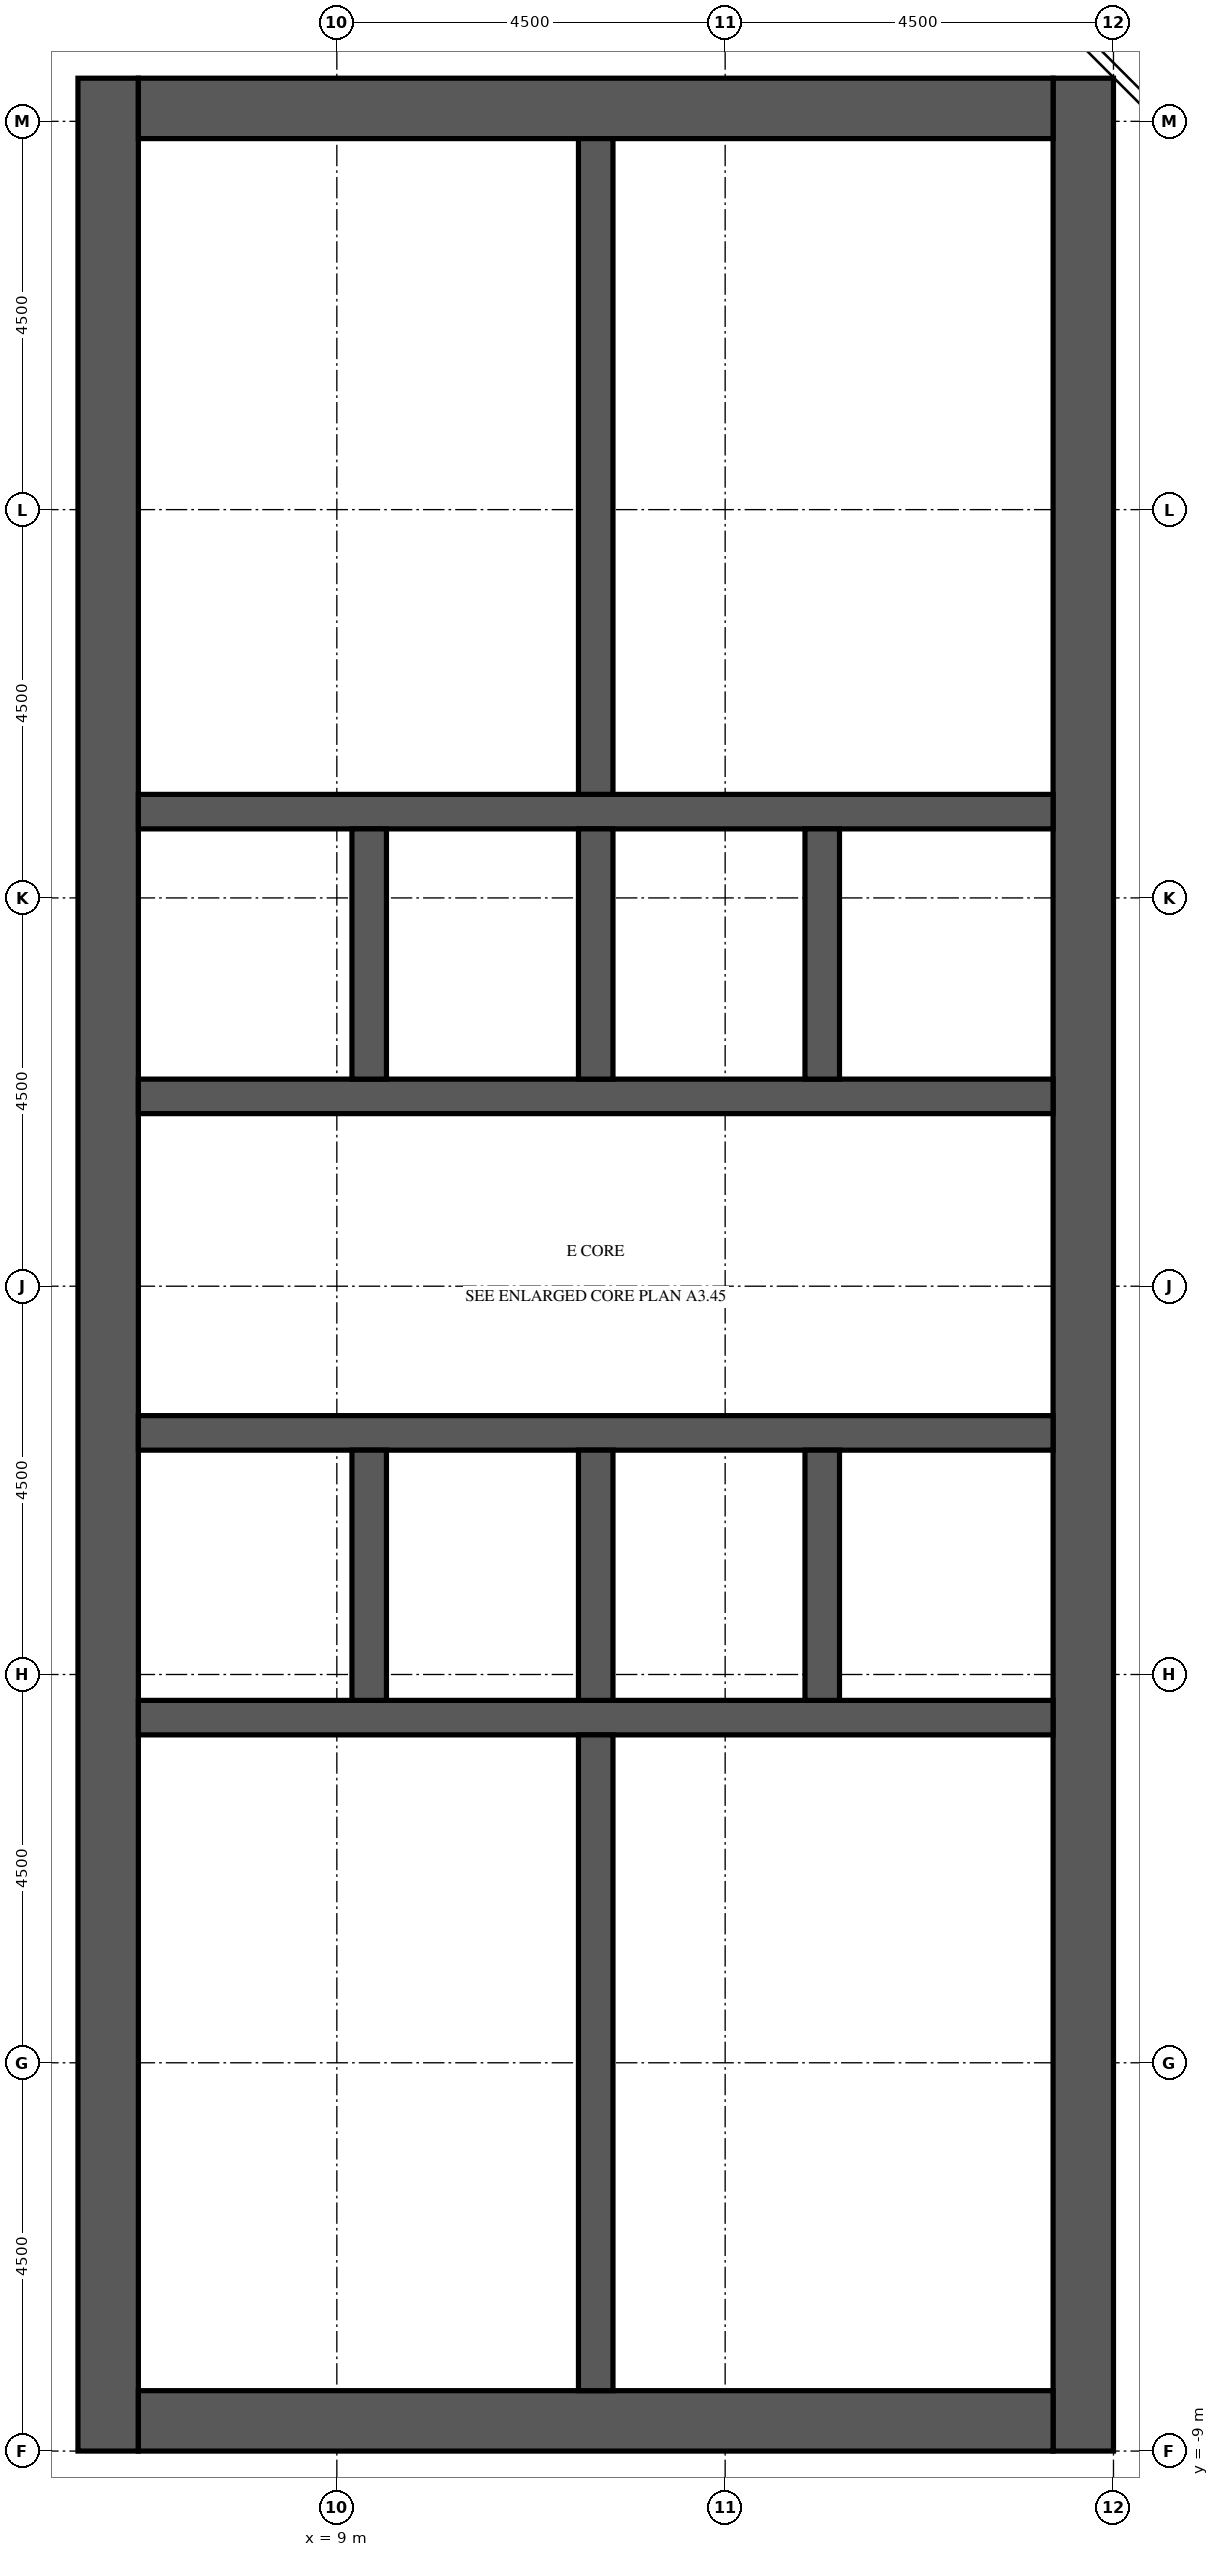
"""IFC4 building model, lengths in metres.
Left out: names, types, materials, properties, quantities, classifications, styles, units other than length and angle.
Written with IfcOpenShell. Run it as: python <this file> out.ifc"""

import sys

from ifc_helpers import new_model, si_unit, direction, frame, frame_2d, origin, place, context, subcontext, project, spatial, rectangle, extrude, element, fill, save


model = new_model("IFC4")
c1 = context("Model", 3, precision=1e-05, world=origin(), true_north=direction((0.0, 1.0)))
c2 = subcontext(c1, "Body", "Model", "MODEL_VIEW")
j1 = project(units=[si_unit("LENGTHUNIT", "METRE"), si_unit("PLANEANGLEUNIT", "RADIAN")], contexts=[c1])
p1 = place(None, origin())
s1 = spatial("IfcSite", under=j1, at=p1, CompositionType="ELEMENT")
p2 = place(p1, origin())
s2 = spatial("IfcBuilding", under=s1, at=p2, CompositionType="ELEMENT")
p3 = place(p2, frame((0.0, 0.0, 316.6)))
s3 = spatial("IfcBuildingStorey", under=s2, at=p3, CompositionType="ELEMENT", Elevation=316.6)
p4 = place(p3, frame((6.35, -9.0, 0.0), z_axis=(0.0, 0.0, 1.0), x_axis=(0.0, 1.0, 0.0)))
e1 = element("IfcWall", 1, at=p4, inside=s3, PredefinedType="SHEAR", context=c2, shape_type="SweptSolid", body=[
    extrude(rectangle(XDim=27.5, YDim=0.7, at=frame_2d((13.75, 0.0))), origin(), (0.0, 0.0, 1.0), 4.8),
])
p5 = place(p4, frame((12.55, 0.0, 0.0)))
e2 = element("IfcOpeningElement", 2, at=p5, cuts=e1, PredefinedType="OPENING", context=c2, shape_type="SweptSolid", body=[
    extrude(rectangle(XDim=2.4, YDim=2.4, at=frame_2d((1.2, 1.2))), frame((0.0, 0.36, 0.0), z_axis=(0.0, -1.0, 0.0), x_axis=(1.0, 0.0, 0.0)), (0.0, 0.0, 1.0), 0.72),
])
p6 = place(p4, frame((3.9, 0.0, 0.0)))
e3 = element("IfcOpeningElement", 3, at=p6, cuts=e1, PredefinedType="OPENING", context=c2, shape_type="SweptSolid", body=[
    extrude(rectangle(XDim=1.2, YDim=2.1, at=frame_2d((0.6, 1.05))), frame((0.0, 0.36, 0.0), z_axis=(0.0, -1.0, 0.0), x_axis=(1.0, 0.0, 0.0)), (0.0, 0.0, 1.0), 0.72),
])
p7 = place(p4, frame((22.4, 0.0, 0.0)))
e4 = element("IfcOpeningElement", 4, at=p7, cuts=e1, PredefinedType="OPENING", context=c2, shape_type="SweptSolid", body=[
    extrude(rectangle(XDim=1.2, YDim=2.1, at=frame_2d((0.6, 1.05))), frame((0.0, 0.36, 0.0), z_axis=(0.0, -1.0, 0.0), x_axis=(1.0, 0.0, 0.0)), (0.0, 0.0, 1.0), 0.72),
])
p8 = place(p3, frame((17.65, -9.0, 0.0), z_axis=(0.0, 0.0, 1.0), x_axis=(0.0, 1.0, 0.0)))
e5 = element("IfcWall", 5, at=p8, inside=s3, PredefinedType="SHEAR", context=c2, shape_type="SweptSolid", body=[
    extrude(rectangle(XDim=27.5, YDim=0.7, at=frame_2d((13.75, 0.0))), origin(), (0.0, 0.0, 1.0), 4.8),
])
for number, where, z_axis, x_axis in (
    (6, (6.7, -8.65, 0.0), (0.0, 0.0, 1.0), (1.0, 0.0, 0.0)),
    (7, (6.7, 18.15, 0.0), (0.0, 0.0, 1.0), (1.0, 0.0, 0.0)),
):
    element("IfcWall", number, at=place(p3, frame(where, z_axis=z_axis, x_axis=x_axis)), inside=s3, PredefinedType="SHEAR", context=c2, shape_type="SweptSolid", body=[
        extrude(rectangle(XDim=10.6, YDim=0.7, at=frame_2d((5.3, 0.0))), origin(), (0.0, 0.0, 1.0), 4.8),
    ])
p9 = place(p3, frame((6.7, -0.5, 0.0), z_axis=(0.0, 0.0, 1.0), x_axis=(1.0, 0.0, 0.0)))
e8 = element("IfcWall", 8, at=p9, inside=s3, PredefinedType="SHEAR", context=c2, shape_type="SweptSolid", body=[
    extrude(rectangle(XDim=10.6, YDim=0.4, at=frame_2d((5.3, 0.0))), origin(), (0.0, 0.0, 1.0), 4.8),
])
p10 = place(p3, frame((6.7, 2.8, 0.0), z_axis=(0.0, 0.0, 1.0), x_axis=(1.0, 0.0, 0.0)))
e9 = element("IfcWall", 9, at=p10, inside=s3, PredefinedType="SHEAR", context=c2, shape_type="SweptSolid", body=[
    extrude(rectangle(XDim=10.6, YDim=0.4, at=frame_2d((5.3, 0.0))), origin(), (0.0, 0.0, 1.0), 4.8),
])
p11 = place(p10, frame((0.688, 0.0, 0.0)))
e10 = element("IfcOpeningElement", 10, at=p11, cuts=e9, PredefinedType="OPENING", context=c2, shape_type="SweptSolid", body=[
    extrude(rectangle(XDim=1.1, YDim=2.1, at=frame_2d((0.55, 1.05))), frame((0.0, 0.21, 0.0), z_axis=(0.0, -1.0, 0.0), x_axis=(1.0, 0.0, 0.0)), (0.0, 0.0, 1.0), 0.42),
])
p12 = place(p10, frame((3.438, 0.0, 0.0)))
e11 = element("IfcOpeningElement", 11, at=p12, cuts=e9, PredefinedType="OPENING", context=c2, shape_type="SweptSolid", body=[
    extrude(rectangle(XDim=1.1, YDim=2.1, at=frame_2d((0.55, 1.05))), frame((0.0, 0.21, 0.0), z_axis=(0.0, -1.0, 0.0), x_axis=(1.0, 0.0, 0.0)), (0.0, 0.0, 1.0), 0.42),
])
p13 = place(p10, frame((6.113, 0.0, 0.0)))
e12 = element("IfcOpeningElement", 12, at=p13, cuts=e9, PredefinedType="OPENING", context=c2, shape_type="SweptSolid", body=[
    extrude(rectangle(XDim=1.0, YDim=2.1, at=frame_2d((0.5, 1.05))), frame((0.0, 0.21, 0.0), z_axis=(0.0, -1.0, 0.0), x_axis=(1.0, 0.0, 0.0)), (0.0, 0.0, 1.0), 0.42),
])
p14 = place(p10, frame((8.863, 0.0, 0.0)))
e13 = element("IfcOpeningElement", 13, at=p14, cuts=e9, PredefinedType="OPENING", context=c2, shape_type="SweptSolid", body=[
    extrude(rectangle(XDim=1.0, YDim=2.1, at=frame_2d((0.5, 1.05))), frame((0.0, 0.21, 0.0), z_axis=(0.0, -1.0, 0.0), x_axis=(1.0, 0.0, 0.0)), (0.0, 0.0, 1.0), 0.42),
])
p15 = place(p3, frame((6.7, 6.7, 0.0), z_axis=(0.0, 0.0, 1.0), x_axis=(1.0, 0.0, 0.0)))
e14 = element("IfcWall", 14, at=p15, inside=s3, PredefinedType="SHEAR", context=c2, shape_type="SweptSolid", body=[
    extrude(rectangle(XDim=10.6, YDim=0.4, at=frame_2d((5.3, 0.0))), origin(), (0.0, 0.0, 1.0), 4.8),
])
p16 = place(p15, frame((0.738, 0.0, 0.0)))
e15 = element("IfcOpeningElement", 15, at=p16, cuts=e14, PredefinedType="OPENING", context=c2, shape_type="SweptSolid", body=[
    extrude(rectangle(XDim=1.0, YDim=2.1, at=frame_2d((0.5, 1.05))), frame((0.0, 0.21, 0.0), z_axis=(0.0, -1.0, 0.0), x_axis=(1.0, 0.0, 0.0)), (0.0, 0.0, 1.0), 0.42),
])
p17 = place(p15, frame((3.488, 0.0, 0.0)))
e16 = element("IfcOpeningElement", 16, at=p17, cuts=e14, PredefinedType="OPENING", context=c2, shape_type="SweptSolid", body=[
    extrude(rectangle(XDim=1.0, YDim=2.1, at=frame_2d((0.5, 1.05))), frame((0.0, 0.21, 0.0), z_axis=(0.0, -1.0, 0.0), x_axis=(1.0, 0.0, 0.0)), (0.0, 0.0, 1.0), 0.42),
])
p18 = place(p15, frame((6.113, 0.0, 0.0)))
e17 = element("IfcOpeningElement", 17, at=p18, cuts=e14, PredefinedType="OPENING", context=c2, shape_type="SweptSolid", body=[
    extrude(rectangle(XDim=1.0, YDim=2.1, at=frame_2d((0.5, 1.05))), frame((0.0, 0.21, 0.0), z_axis=(0.0, -1.0, 0.0), x_axis=(1.0, 0.0, 0.0)), (0.0, 0.0, 1.0), 0.42),
])
p19 = place(p15, frame((8.863, 0.0, 0.0)))
e18 = element("IfcOpeningElement", 18, at=p19, cuts=e14, PredefinedType="OPENING", context=c2, shape_type="SweptSolid", body=[
    extrude(rectangle(XDim=1.0, YDim=2.1, at=frame_2d((0.5, 1.05))), frame((0.0, 0.21, 0.0), z_axis=(0.0, -1.0, 0.0), x_axis=(1.0, 0.0, 0.0)), (0.0, 0.0, 1.0), 0.42),
])
p20 = place(p3, frame((6.7, 10.0, 0.0), z_axis=(0.0, 0.0, 1.0), x_axis=(1.0, 0.0, 0.0)))
e19 = element("IfcWall", 19, at=p20, inside=s3, PredefinedType="SHEAR", context=c2, shape_type="SweptSolid", body=[
    extrude(rectangle(XDim=10.6, YDim=0.4, at=frame_2d((5.3, 0.0))), origin(), (0.0, 0.0, 1.0), 4.8),
])
for number, where, z_axis, x_axis in (
    (20, (9.375, -0.3, 0.0), (0.0, 0.0, 1.0), (0.0, 1.0, 0.0)),
    (21, (9.375, 6.9, 0.0), (0.0, 0.0, 1.0), (0.0, 1.0, 0.0)),
    (22, (12.0, -0.3, 0.0), (0.0, 0.0, 1.0), (0.0, 1.0, 0.0)),
    (23, (12.0, 6.9, 0.0), (0.0, 0.0, 1.0), (0.0, 1.0, 0.0)),
    (24, (14.625, -0.3, 0.0), (0.0, 0.0, 1.0), (0.0, 1.0, 0.0)),
    (25, (14.625, 6.9, 0.0), (0.0, 0.0, 1.0), (0.0, 1.0, 0.0)),
):
    element("IfcWall", number, at=place(p3, frame(where, z_axis=z_axis, x_axis=x_axis)), inside=s3, PredefinedType="SHEAR", context=c2, shape_type="SweptSolid", body=[
        extrude(rectangle(XDim=2.9, YDim=0.4, at=frame_2d((1.45, 0.0))), origin(), (0.0, 0.0, 1.0), 4.8),
    ])
p21 = place(p3, frame((12.0, -8.3, 0.0), z_axis=(0.0, 0.0, 1.0), x_axis=(0.0, 1.0, 0.0)))
e26 = element("IfcWall", 26, at=p21, inside=s3, PredefinedType="SHEAR", context=c2, shape_type="SweptSolid", body=[
    extrude(rectangle(XDim=7.6, YDim=0.4, at=frame_2d((3.8, 0.0))), origin(), (0.0, 0.0, 1.0), 4.8),
])
p22 = place(p21, frame((6.125, 0.0, 0.0)))
e27 = element("IfcOpeningElement", 27, at=p22, cuts=e26, PredefinedType="OPENING", context=c2, shape_type="SweptSolid", body=[
    extrude(rectangle(XDim=1.2, YDim=2.1, at=frame_2d((0.6, 1.05))), frame((0.0, 0.21, 0.0), z_axis=(0.0, -1.0, 0.0), x_axis=(1.0, 0.0, 0.0)), (0.0, 0.0, 1.0), 0.42),
])
p23 = place(p3, frame((12.0, 10.2, 0.0), z_axis=(0.0, 0.0, 1.0), x_axis=(0.0, 1.0, 0.0)))
e28 = element("IfcWall", 28, at=p23, inside=s3, PredefinedType="SHEAR", context=c2, shape_type="SweptSolid", body=[
    extrude(rectangle(XDim=7.6, YDim=0.4, at=frame_2d((3.8, 0.0))), origin(), (0.0, 0.0, 1.0), 4.8),
])
p24 = place(p23, frame((0.275, 0.0, 0.0)))
e29 = element("IfcOpeningElement", 29, at=p24, cuts=e28, PredefinedType="OPENING", context=c2, shape_type="SweptSolid", body=[
    extrude(rectangle(XDim=1.2, YDim=2.1, at=frame_2d((0.6, 1.05))), frame((0.0, 0.21, 0.0), z_axis=(0.0, -1.0, 0.0), x_axis=(1.0, 0.0, 0.0)), (0.0, 0.0, 1.0), 0.42),
])
p25 = place(p11, origin())
e30 = element("IfcDoor", 30, at=p25, inside=s3, OperationType="DOUBLE_DOOR_SLIDING", PredefinedType="DOOR", context=c2, shape_type="SweptSolid", body=[
    extrude(rectangle(XDim=1.1, YDim=2.1, at=frame_2d((0.55, 1.05))), frame((0.0, 0.025, 0.0), z_axis=(0.0, -1.0, 0.0), x_axis=(1.0, 0.0, 0.0)), (0.0, 0.0, 1.0), 0.05),
])
fill(e10, e30)
p26 = place(p12, origin())
e31 = element("IfcDoor", 31, at=p26, inside=s3, OperationType="DOUBLE_DOOR_SLIDING", PredefinedType="DOOR", context=c2, shape_type="SweptSolid", body=[
    extrude(rectangle(XDim=1.1, YDim=2.1, at=frame_2d((0.55, 1.05))), frame((0.0, 0.025, 0.0), z_axis=(0.0, -1.0, 0.0), x_axis=(1.0, 0.0, 0.0)), (0.0, 0.0, 1.0), 0.05),
])
fill(e11, e31)
p27 = place(p5, origin())
e32 = element("IfcDoor", 32, at=p27, inside=s3, OperationType="DOUBLE_DOOR_DOUBLE_SWING", PredefinedType="DOOR", context=c2, shape_type="SweptSolid", body=[
    extrude(rectangle(XDim=2.4, YDim=2.4, at=frame_2d((1.2, 1.2))), frame((0.0, 0.025, 0.0), z_axis=(0.0, -1.0, 0.0), x_axis=(1.0, 0.0, 0.0)), (0.0, 0.0, 1.0), 0.05),
])
fill(e2, e32)
p28 = place(p22, origin())
e33 = element("IfcDoor", 33, at=p28, inside=s3, OperationType="SINGLE_SWING_RIGHT", PredefinedType="DOOR", context=c2, shape_type="SweptSolid", body=[
    extrude(rectangle(XDim=1.2, YDim=2.1, at=frame_2d((0.6, 1.05))), frame((0.0, 0.025, 0.0), z_axis=(0.0, -1.0, 0.0), x_axis=(1.0, 0.0, 0.0)), (0.0, 0.0, 1.0), 0.05),
])
fill(e27, e33)
p29 = place(p24, origin())
e34 = element("IfcDoor", 34, at=p29, inside=s3, OperationType="SINGLE_SWING_RIGHT", PredefinedType="DOOR", context=c2, shape_type="SweptSolid", body=[
    extrude(rectangle(XDim=1.2, YDim=2.1, at=frame_2d((0.6, 1.05))), frame((0.0, 0.025, 0.0), z_axis=(0.0, -1.0, 0.0), x_axis=(1.0, 0.0, 0.0)), (0.0, 0.0, 1.0), 0.05),
])
fill(e29, e34)
p30 = place(p13, origin())
e35 = element("IfcDoor", 35, at=p30, inside=s3, OperationType="SINGLE_SWING_LEFT", PredefinedType="DOOR", context=c2, shape_type="SweptSolid", body=[
    extrude(rectangle(XDim=1.0, YDim=2.1, at=frame_2d((0.5, 1.05))), frame((0.0, 0.025, 0.0), z_axis=(0.0, -1.0, 0.0), x_axis=(1.0, 0.0, 0.0)), (0.0, 0.0, 1.0), 0.05),
])
fill(e12, e35)
p31 = place(p14, origin())
e36 = element("IfcDoor", 36, at=p31, inside=s3, OperationType="SINGLE_SWING_RIGHT", PredefinedType="DOOR", context=c2, shape_type="SweptSolid", body=[
    extrude(rectangle(XDim=1.0, YDim=2.1, at=frame_2d((0.5, 1.05))), frame((0.0, 0.025, 0.0), z_axis=(0.0, -1.0, 0.0), x_axis=(1.0, 0.0, 0.0)), (0.0, 0.0, 1.0), 0.05),
])
fill(e13, e36)
p32 = place(p16, origin())
e37 = element("IfcDoor", 37, at=p32, inside=s3, OperationType="SINGLE_SWING_LEFT", PredefinedType="DOOR", context=c2, shape_type="SweptSolid", body=[
    extrude(rectangle(XDim=1.0, YDim=2.1, at=frame_2d((0.5, 1.05))), frame((0.0, 0.025, 0.0), z_axis=(0.0, -1.0, 0.0), x_axis=(1.0, 0.0, 0.0)), (0.0, 0.0, 1.0), 0.05),
])
fill(e15, e37)
p33 = place(p17, origin())
e38 = element("IfcDoor", 38, at=p33, inside=s3, OperationType="SINGLE_SWING_RIGHT", PredefinedType="DOOR", context=c2, shape_type="SweptSolid", body=[
    extrude(rectangle(XDim=1.0, YDim=2.1, at=frame_2d((0.5, 1.05))), frame((0.0, 0.025, 0.0), z_axis=(0.0, -1.0, 0.0), x_axis=(1.0, 0.0, 0.0)), (0.0, 0.0, 1.0), 0.05),
])
fill(e16, e38)
p34 = place(p18, origin())
e39 = element("IfcDoor", 39, at=p34, inside=s3, OperationType="SINGLE_SWING_LEFT", PredefinedType="DOOR", context=c2, shape_type="SweptSolid", body=[
    extrude(rectangle(XDim=1.0, YDim=2.1, at=frame_2d((0.5, 1.05))), frame((0.0, 0.025, 0.0), z_axis=(0.0, -1.0, 0.0), x_axis=(1.0, 0.0, 0.0)), (0.0, 0.0, 1.0), 0.05),
])
fill(e17, e39)
p35 = place(p19, origin())
e40 = element("IfcDoor", 40, at=p35, inside=s3, OperationType="SINGLE_SWING_RIGHT", PredefinedType="DOOR", context=c2, shape_type="SweptSolid", body=[
    extrude(rectangle(XDim=1.0, YDim=2.1, at=frame_2d((0.5, 1.05))), frame((0.0, 0.025, 0.0), z_axis=(0.0, -1.0, 0.0), x_axis=(1.0, 0.0, 0.0)), (0.0, 0.0, 1.0), 0.05),
])
fill(e18, e40)
p36 = place(p6, origin())
e41 = element("IfcDoor", 41, at=p36, inside=s3, OperationType="SINGLE_SWING_RIGHT", PredefinedType="DOOR", context=c2, shape_type="SweptSolid", body=[
    extrude(rectangle(XDim=1.2, YDim=2.1, at=frame_2d((0.6, 1.05))), frame((0.0, -0.275, 0.0), z_axis=(0.0, -1.0, 0.0), x_axis=(1.0, 0.0, 0.0)), (0.0, 0.0, 1.0), 0.05),
])
fill(e3, e41)
p37 = place(p7, origin())
e42 = element("IfcDoor", 42, at=p37, inside=s3, OperationType="SINGLE_SWING_RIGHT", PredefinedType="DOOR", context=c2, shape_type="SweptSolid", body=[
    extrude(rectangle(XDim=1.2, YDim=2.1, at=frame_2d((0.6, 1.05))), frame((0.0, -0.275, 0.0), z_axis=(0.0, -1.0, 0.0), x_axis=(1.0, 0.0, 0.0)), (0.0, 0.0, 1.0), 0.05),
])
fill(e4, e42)
save(model, sys.argv[1])
